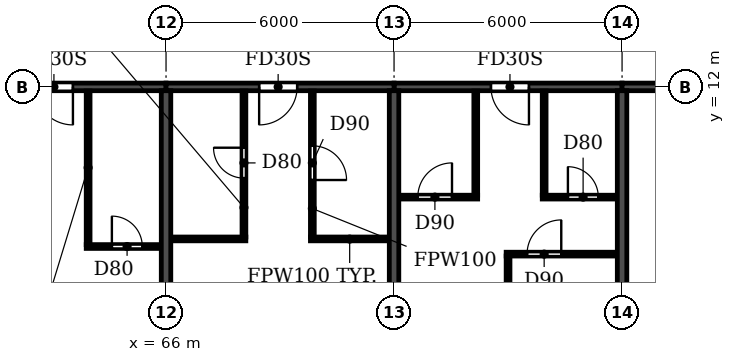
"""IFC4 building model, lengths in metres.
Left out: names, types, materials, properties, quantities, classifications, styles, units other than length and angle.
Written with IfcOpenShell. Run it as: python <this file> out.ifc"""

import sys

from ifc_helpers import new_model, si_unit, direction, frame, frame_2d, origin, place, context, subcontext, project, spatial, rectangle, extrude, element, fill, save


model = new_model("IFC4")
c1 = context("Model", 3, precision=1e-05, world=origin(), true_north=direction((0.0, 1.0)))
c2 = subcontext(c1, "Body", "Model", "MODEL_VIEW")
j1 = project(units=[si_unit("LENGTHUNIT", "METRE"), si_unit("PLANEANGLEUNIT", "RADIAN")], contexts=[c1])
p1 = place(None, origin())
s1 = spatial("IfcSite", under=j1, at=p1, CompositionType="ELEMENT")
p2 = place(p1, origin())
s2 = spatial("IfcBuilding", under=s1, at=p2, CompositionType="ELEMENT")
p3 = place(p2, frame((0.0, 0.0, 221.4)))
s3 = spatial("IfcBuildingStorey", under=s2, at=p3, CompositionType="ELEMENT", Elevation=221.4)
for number, where, z_axis, x_axis in (
    (1, (66.0, 0.2, 0.0), (0.0, 0.0, 1.0), (0.0, 1.0, 0.0)),
    (2, (72.0, 0.2, 0.0), (0.0, 0.0, 1.0), (0.0, 1.0, 0.0)),
    (3, (78.0, 0.2, 0.0), (0.0, 0.0, 1.0), (0.0, 1.0, 0.0)),
):
    element("IfcWall", number, at=place(p3, frame(where, z_axis=z_axis, x_axis=x_axis)), inside=s3, PredefinedType="SHEAR", context=c2, shape_type="SweptSolid", body=[
        extrude(rectangle(XDim=11.7, YDim=0.25, at=frame_2d((5.85, 0.0))), origin(), (0.0, 0.0, 1.0), 3.08),
    ])
p4 = place(p3, frame((60.0, 12.0, 0.0), z_axis=(0.0, 0.0, 1.0), x_axis=(1.0, 0.0, 0.0)))
e4 = element("IfcWall", 4, at=p4, inside=s3, PredefinedType="SHEAR", context=c2, shape_type="SweptSolid", body=[
    extrude(rectangle(XDim=6.0, YDim=0.2, at=frame_2d((3.0, 0.0))), origin(), (0.0, 0.0, 1.0), 2.48),
])
p5 = place(p4, frame((2.55, 0.0, 0.0)))
e5 = element("IfcOpeningElement", 5, at=p5, cuts=e4, PredefinedType="OPENING", context=c2, shape_type="SweptSolid", body=[
    extrude(rectangle(XDim=1.0, YDim=2.1, at=frame_2d((0.5, 1.05))), frame((0.0, 0.11, 0.0), z_axis=(0.0, -1.0, 0.0), x_axis=(1.0, 0.0, 0.0)), (0.0, 0.0, 1.0), 0.22),
])
p6 = place(p3, frame((66.0, 12.0, 0.0), z_axis=(0.0, 0.0, 1.0), x_axis=(1.0, 0.0, 0.0)))
e6 = element("IfcWall", 6, at=p6, inside=s3, PredefinedType="SHEAR", context=c2, shape_type="SweptSolid", body=[
    extrude(rectangle(XDim=6.0, YDim=0.2, at=frame_2d((3.0, 0.0))), origin(), (0.0, 0.0, 1.0), 2.48),
])
p7 = place(p6, frame((2.45, 0.0, 0.0)))
e7 = element("IfcOpeningElement", 7, at=p7, cuts=e6, PredefinedType="OPENING", context=c2, shape_type="SweptSolid", body=[
    extrude(rectangle(XDim=1.0, YDim=2.1, at=frame_2d((0.5, 1.05))), frame((0.0, 0.11, 0.0), z_axis=(0.0, -1.0, 0.0), x_axis=(1.0, 0.0, 0.0)), (0.0, 0.0, 1.0), 0.22),
])
p8 = place(p3, frame((72.0, 12.0, 0.0), z_axis=(0.0, 0.0, 1.0), x_axis=(1.0, 0.0, 0.0)))
e8 = element("IfcWall", 8, at=p8, inside=s3, PredefinedType="SHEAR", context=c2, shape_type="SweptSolid", body=[
    extrude(rectangle(XDim=6.0, YDim=0.2, at=frame_2d((3.0, 0.0))), origin(), (0.0, 0.0, 1.0), 2.48),
])
p9 = place(p8, frame((2.55, 0.0, 0.0)))
e9 = element("IfcOpeningElement", 9, at=p9, cuts=e8, PredefinedType="OPENING", context=c2, shape_type="SweptSolid", body=[
    extrude(rectangle(XDim=1.0, YDim=2.1, at=frame_2d((0.5, 1.05))), frame((0.0, 0.11, 0.0), z_axis=(0.0, -1.0, 0.0), x_axis=(1.0, 0.0, 0.0)), (0.0, 0.0, 1.0), 0.22),
])
p10 = place(p3, frame((78.0, 12.0, 0.0), z_axis=(0.0, 0.0, 1.0), x_axis=(1.0, 0.0, 0.0)))
e10 = element("IfcWall", 10, at=p10, inside=s3, PredefinedType="SHEAR", context=c2, shape_type="SweptSolid", body=[
    extrude(rectangle(XDim=5.8, YDim=0.2, at=frame_2d((2.9, 0.0))), origin(), (0.0, 0.0, 1.0), 2.48),
])
p11 = place(p10, frame((2.5, 0.0, 0.0)))
e11 = element("IfcOpeningElement", 11, at=p11, cuts=e10, PredefinedType="OPENING", context=c2, shape_type="SweptSolid", body=[
    extrude(rectangle(XDim=1.0, YDim=2.1, at=frame_2d((0.5, 1.05))), frame((0.0, 0.11, 0.0), z_axis=(0.0, -1.0, 0.0), x_axis=(1.0, 0.0, 0.0)), (0.0, 0.0, 1.0), 0.22),
])
p12 = place(p3, frame((74.95, 7.6, 0.0), z_axis=(0.0, 0.0, 1.0), x_axis=(1.0, 0.0, 0.0)))
e12 = element("IfcWall", 12, at=p12, inside=s3, PredefinedType="PARTITIONING", context=c2, shape_type="SweptSolid", body=[
    extrude(rectangle(XDim=2.915, YDim=0.1, at=frame_2d((1.458, 0.0))), origin(), (0.0, 0.0, 1.0), 3.08),
])
p13 = place(p12, frame((0.55, 0.0, 0.0)))
e13 = element("IfcOpeningElement", 13, at=p13, cuts=e12, PredefinedType="OPENING", context=c2, shape_type="SweptSolid", body=[
    extrude(rectangle(XDim=0.9, YDim=2.1, at=frame_2d((0.45, 1.05))), frame((0.0, 0.06, 0.0), z_axis=(0.0, -1.0, 0.0), x_axis=(1.0, 0.0, 0.0)), (0.0, 0.0, 1.0), 0.12),
])
p14 = place(p3, frame((63.9, 7.8, 0.0), z_axis=(0.0, 0.0, 1.0), x_axis=(1.0, 0.0, 0.0)))
e14 = element("IfcWall", 14, at=p14, inside=s3, PredefinedType="PARTITIONING", context=c2, shape_type="SweptSolid", body=[
    extrude(rectangle(XDim=1.965, YDim=0.1, at=frame_2d((0.982, 0.0))), origin(), (0.0, 0.0, 1.0), 3.08),
])
p15 = place(p14, frame((0.675, 0.0, 0.0)))
e15 = element("IfcOpeningElement", 15, at=p15, cuts=e14, PredefinedType="OPENING", context=c2, shape_type="SweptSolid", body=[
    extrude(rectangle(XDim=0.8, YDim=2.1, at=frame_2d((0.4, 1.05))), frame((0.0, 0.06, 0.0), z_axis=(0.0, -1.0, 0.0), x_axis=(1.0, 0.0, 0.0)), (0.0, 0.0, 1.0), 0.12),
])
p16 = place(p3, frame((66.135, 8.0, 0.0), z_axis=(0.0, 0.0, 1.0), x_axis=(1.0, 0.0, 0.0)))
e16 = element("IfcWall", 16, at=p16, inside=s3, PredefinedType="PARTITIONING", context=c2, shape_type="SweptSolid", body=[
    extrude(rectangle(XDim=1.965, YDim=0.1, at=frame_2d((0.982, 0.0))), origin(), (0.0, 0.0, 1.0), 3.08),
])
p17 = place(p3, frame((69.8, 8.0, 0.0), z_axis=(0.0, 0.0, 1.0), x_axis=(1.0, 0.0, 0.0)))
e17 = element("IfcWall", 17, at=p17, inside=s3, PredefinedType="PARTITIONING", context=c2, shape_type="SweptSolid", body=[
    extrude(rectangle(XDim=2.065, YDim=0.1, at=frame_2d((1.032, 0.0))), origin(), (0.0, 0.0, 1.0), 3.08),
])
p18 = place(p3, frame((72.135, 9.1, 0.0), z_axis=(0.0, 0.0, 1.0), x_axis=(1.0, 0.0, 0.0)))
e18 = element("IfcWall", 18, at=p18, inside=s3, PredefinedType="PARTITIONING", context=c2, shape_type="SweptSolid", body=[
    extrude(rectangle(XDim=2.065, YDim=0.1, at=frame_2d((1.032, 0.0))), origin(), (0.0, 0.0, 1.0), 3.08),
])
p19 = place(p18, frame((0.49, 0.0, 0.0)))
e19 = element("IfcOpeningElement", 19, at=p19, cuts=e18, PredefinedType="OPENING", context=c2, shape_type="SweptSolid", body=[
    extrude(rectangle(XDim=0.9, YDim=2.1, at=frame_2d((0.45, 1.05))), frame((0.0, 0.06, 0.0), z_axis=(0.0, -1.0, 0.0), x_axis=(1.0, 0.0, 0.0)), (0.0, 0.0, 1.0), 0.12),
])
p20 = place(p3, frame((75.9, 9.1, 0.0), z_axis=(0.0, 0.0, 1.0), x_axis=(1.0, 0.0, 0.0)))
e20 = element("IfcWall", 20, at=p20, inside=s3, PredefinedType="PARTITIONING", context=c2, shape_type="SweptSolid", body=[
    extrude(rectangle(XDim=1.965, YDim=0.1, at=frame_2d((0.982, 0.0))), origin(), (0.0, 0.0, 1.0), 3.08),
])
p21 = place(p20, frame((0.675, 0.0, 0.0)))
e21 = element("IfcOpeningElement", 21, at=p21, cuts=e20, PredefinedType="OPENING", context=c2, shape_type="SweptSolid", body=[
    extrude(rectangle(XDim=0.8, YDim=2.1, at=frame_2d((0.4, 1.05))), frame((0.0, 0.06, 0.0), z_axis=(0.0, -1.0, 0.0), x_axis=(1.0, 0.0, 0.0)), (0.0, 0.0, 1.0), 0.12),
])
p22 = place(p3, frame((63.95, 7.85, 0.0), z_axis=(0.0, 0.0, 1.0), x_axis=(0.0, 1.0, 0.0)))
e22 = element("IfcWall", 22, at=p22, inside=s3, PredefinedType="PARTITIONING", context=c2, shape_type="SweptSolid", body=[
    extrude(rectangle(XDim=4.04, YDim=0.1, at=frame_2d((2.02, 0.0))), origin(), (0.0, 0.0, 1.0), 3.08),
])
p23 = place(p3, frame((68.05, 8.05, 0.0), z_axis=(0.0, 0.0, 1.0), x_axis=(0.0, 1.0, 0.0)))
e23 = element("IfcWall", 23, at=p23, inside=s3, PredefinedType="PARTITIONING", context=c2, shape_type="SweptSolid", body=[
    extrude(rectangle(XDim=3.84, YDim=0.1, at=frame_2d((1.92, 0.0))), origin(), (0.0, 0.0, 1.0), 3.08),
])
p24 = place(p23, frame((1.55, 0.0, 0.0)))
e24 = element("IfcOpeningElement", 24, at=p24, cuts=e23, PredefinedType="OPENING", context=c2, shape_type="SweptSolid", body=[
    extrude(rectangle(XDim=0.8, YDim=2.1, at=frame_2d((0.4, 1.05))), frame((0.0, 0.06, 0.0), z_axis=(0.0, -1.0, 0.0), x_axis=(1.0, 0.0, 0.0)), (0.0, 0.0, 1.0), 0.12),
])
p25 = place(p3, frame((69.85, 8.05, 0.0), z_axis=(0.0, 0.0, 1.0), x_axis=(0.0, 1.0, 0.0)))
e25 = element("IfcWall", 25, at=p25, inside=s3, PredefinedType="PARTITIONING", context=c2, shape_type="SweptSolid", body=[
    extrude(rectangle(XDim=3.84, YDim=0.1, at=frame_2d((1.92, 0.0))), origin(), (0.0, 0.0, 1.0), 3.08),
])
p26 = place(p25, frame((1.5, 0.0, 0.0)))
e26 = element("IfcOpeningElement", 26, at=p26, cuts=e25, PredefinedType="OPENING", context=c2, shape_type="SweptSolid", body=[
    extrude(rectangle(XDim=0.9, YDim=2.1, at=frame_2d((0.45, 1.05))), frame((0.0, 0.06, 0.0), z_axis=(0.0, -1.0, 0.0), x_axis=(1.0, 0.0, 0.0)), (0.0, 0.0, 1.0), 0.12),
])
p27 = place(p3, frame((74.15, 9.15, 0.0), z_axis=(0.0, 0.0, 1.0), x_axis=(0.0, 1.0, 0.0)))
e27 = element("IfcWall", 27, at=p27, inside=s3, PredefinedType="PARTITIONING", context=c2, shape_type="SweptSolid", body=[
    extrude(rectangle(XDim=2.74, YDim=0.1, at=frame_2d((1.37, 0.0))), origin(), (0.0, 0.0, 1.0), 3.08),
])
p28 = place(p3, frame((75.0, 0.06, 0.0), z_axis=(0.0, 0.0, 1.0), x_axis=(0.0, 1.0, 0.0)))
e28 = element("IfcWall", 28, at=p28, inside=s3, PredefinedType="PARTITIONING", context=c2, shape_type="SweptSolid", body=[
    extrude(rectangle(XDim=7.49, YDim=0.1, at=frame_2d((3.745, 0.0))), origin(), (0.0, 0.0, 1.0), 3.08),
])
p29 = place(p3, frame((75.95, 9.15, 0.0), z_axis=(0.0, 0.0, 1.0), x_axis=(0.0, 1.0, 0.0)))
e29 = element("IfcWall", 29, at=p29, inside=s3, PredefinedType="PARTITIONING", context=c2, shape_type="SweptSolid", body=[
    extrude(rectangle(XDim=2.74, YDim=0.1, at=frame_2d((1.37, 0.0))), origin(), (0.0, 0.0, 1.0), 3.08),
])
p30 = place(p5, frame((1.0, 0.0, 0.0), z_axis=(0.0, 0.0, 1.0), x_axis=(-1.0, 0.0, 0.0)))
e30 = element("IfcDoor", 30, at=p30, inside=s3, OperationType="SINGLE_SWING_LEFT", PredefinedType="DOOR", context=c2, shape_type="SweptSolid", body=[
    extrude(rectangle(XDim=1.0, YDim=2.1, at=frame_2d((0.5, 1.05))), frame((0.0, 0.025, 0.0), z_axis=(0.0, -1.0, 0.0), x_axis=(1.0, 0.0, 0.0)), (0.0, 0.0, 1.0), 0.05),
])
fill(e5, e30)
p31 = place(p15, origin())
e31 = element("IfcDoor", 31, at=p31, inside=s3, OperationType="SINGLE_SWING_LEFT", PredefinedType="DOOR", context=c2, shape_type="SweptSolid", body=[
    extrude(rectangle(XDim=0.8, YDim=2.1, at=frame_2d((0.4, 1.05))), frame((0.0, 0.025, 0.0), z_axis=(0.0, -1.0, 0.0), x_axis=(1.0, 0.0, 0.0)), (0.0, 0.0, 1.0), 0.05),
])
fill(e15, e31)
p32 = place(p24, origin())
e32 = element("IfcDoor", 32, at=p32, inside=s3, OperationType="SINGLE_SWING_RIGHT", PredefinedType="DOOR", context=c2, shape_type="SweptSolid", body=[
    extrude(rectangle(XDim=0.8, YDim=2.1, at=frame_2d((0.4, 1.05))), frame((0.0, 0.025, 0.0), z_axis=(0.0, -1.0, 0.0), x_axis=(1.0, 0.0, 0.0)), (0.0, 0.0, 1.0), 0.05),
])
fill(e24, e32)
p33 = place(p7, frame((1.0, 0.0, 0.0), z_axis=(0.0, 0.0, 1.0), x_axis=(-1.0, 0.0, 0.0)))
e33 = element("IfcDoor", 33, at=p33, inside=s3, OperationType="SINGLE_SWING_RIGHT", PredefinedType="DOOR", context=c2, shape_type="SweptSolid", body=[
    extrude(rectangle(XDim=1.0, YDim=2.1, at=frame_2d((0.5, 1.05))), frame((0.0, 0.025, 0.0), z_axis=(0.0, -1.0, 0.0), x_axis=(1.0, 0.0, 0.0)), (0.0, 0.0, 1.0), 0.05),
])
fill(e7, e33)
p34 = place(p26, frame((0.9, 0.0, 0.0), z_axis=(0.0, 0.0, 1.0), x_axis=(-1.0, 0.0, 0.0)))
e34 = element("IfcDoor", 34, at=p34, inside=s3, OperationType="SINGLE_SWING_RIGHT", PredefinedType="DOOR", context=c2, shape_type="SweptSolid", body=[
    extrude(rectangle(XDim=0.9, YDim=2.1, at=frame_2d((0.45, 1.05))), frame((0.0, 0.025, 0.0), z_axis=(0.0, -1.0, 0.0), x_axis=(1.0, 0.0, 0.0)), (0.0, 0.0, 1.0), 0.05),
])
fill(e26, e34)
p35 = place(p19, origin())
e35 = element("IfcDoor", 35, at=p35, inside=s3, OperationType="SINGLE_SWING_RIGHT", PredefinedType="DOOR", context=c2, shape_type="SweptSolid", body=[
    extrude(rectangle(XDim=0.9, YDim=2.1, at=frame_2d((0.45, 1.05))), frame((0.0, 0.025, 0.0), z_axis=(0.0, -1.0, 0.0), x_axis=(1.0, 0.0, 0.0)), (0.0, 0.0, 1.0), 0.05),
])
fill(e19, e35)
p36 = place(p9, frame((1.0, 0.0, 0.0), z_axis=(0.0, 0.0, 1.0), x_axis=(-1.0, 0.0, 0.0)))
e36 = element("IfcDoor", 36, at=p36, inside=s3, OperationType="SINGLE_SWING_LEFT", PredefinedType="DOOR", context=c2, shape_type="SweptSolid", body=[
    extrude(rectangle(XDim=1.0, YDim=2.1, at=frame_2d((0.5, 1.05))), frame((0.0, 0.025, 0.0), z_axis=(0.0, -1.0, 0.0), x_axis=(1.0, 0.0, 0.0)), (0.0, 0.0, 1.0), 0.05),
])
fill(e9, e36)
p37 = place(p13, origin())
e37 = element("IfcDoor", 37, at=p37, inside=s3, OperationType="SINGLE_SWING_RIGHT", PredefinedType="DOOR", context=c2, shape_type="SweptSolid", body=[
    extrude(rectangle(XDim=0.9, YDim=2.1, at=frame_2d((0.45, 1.05))), frame((0.0, 0.025, 0.0), z_axis=(0.0, -1.0, 0.0), x_axis=(1.0, 0.0, 0.0)), (0.0, 0.0, 1.0), 0.05),
])
fill(e13, e37)
p38 = place(p21, origin())
e38 = element("IfcDoor", 38, at=p38, inside=s3, OperationType="SINGLE_SWING_LEFT", PredefinedType="DOOR", context=c2, shape_type="SweptSolid", body=[
    extrude(rectangle(XDim=0.8, YDim=2.1, at=frame_2d((0.4, 1.05))), frame((0.0, 0.025, 0.0), z_axis=(0.0, -1.0, 0.0), x_axis=(1.0, 0.0, 0.0)), (0.0, 0.0, 1.0), 0.05),
])
fill(e21, e38)
save(model, sys.argv[1])
